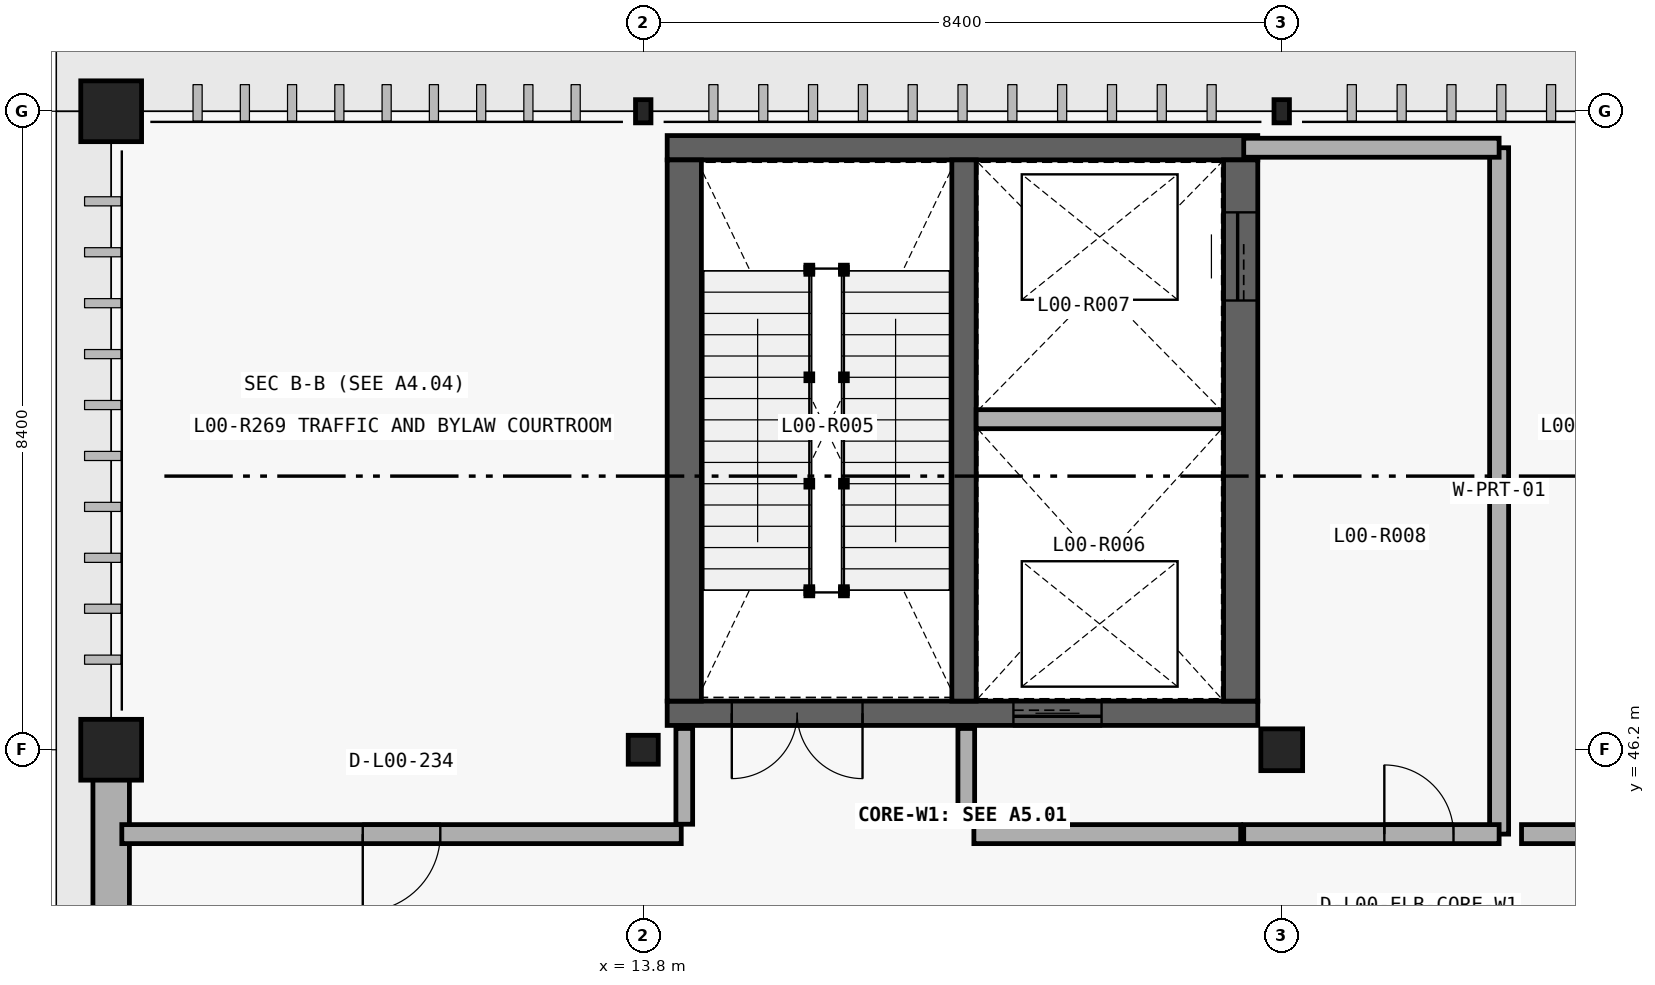
"""IFC4 building model, lengths in metres.
Left out: names, types, materials, properties, quantities, classifications, styles, units other than length and angle.
Written with IfcOpenShell. Run it as: python <this file> out.ifc"""

import sys

from ifc_helpers import new_model, si_unit, direction, frame, frame_2d, origin_with_axes, origin_2d_with_axis, place, context, subcontext, project, spatial, rectangle, hollow_rectangle, circle, i_section, extrude, element, fill, save


model = new_model("IFC4")
c1 = context("Model", 3, precision=1e-05, world=origin_with_axes(), true_north=direction((0.0, 1.0)))
c2 = subcontext(c1, "Body", "Model", "MODEL_VIEW")
j1 = project(units=[si_unit("LENGTHUNIT", "METRE"), si_unit("PLANEANGLEUNIT", "RADIAN")], contexts=[c1])
p1 = place(None, origin_with_axes())
s1 = spatial("IfcSite", under=j1, at=p1, CompositionType="ELEMENT")
p2 = place(p1, origin_with_axes())
s2 = spatial("IfcBuilding", under=s1, at=p2, CompositionType="ELEMENT")
p3 = place(p2, origin_with_axes())
s3 = spatial("IfcBuildingStorey", under=s2, at=p3, CompositionType="ELEMENT", Elevation=0.0)
p4 = place(None, frame((6.8, 40.0, 0.0), z_axis=(0.0, 0.0, 1.0), x_axis=(0.0, 1.0, 0.0)))
e1 = element("IfcWall", 1, at=p4, inside=s3, PredefinedType="SOLIDWALL", context=c2, shape_type="SweptSolid", body=[
    extrude(rectangle(XDim=6.0, YDim=0.48, at=frame_2d((3.0, 0.0), x_axis=(1.0, 0.0))), origin_with_axes(), (0.0, 0.0, 1.0), 4.724),
])
p5 = place(None, frame((6.8, 43.05, 0.0), z_axis=(0.0, 0.0, 1.0), x_axis=(0.0, 1.0, 0.0)))
e2 = element("IfcOpeningElement", 2, at=p5, cuts=e1, PredefinedType="OPENING", context=c2, shape_type="SweptSolid", body=[
    extrude(rectangle(XDim=1.9, YDim=2.4, at=frame_2d((0.0, 1.2), x_axis=(1.0, 0.0))), frame((0.0, 0.25, 0.0), z_axis=(0.0, -1.0, 0.0), x_axis=(1.0, 0.0, 0.0)), (0.0, 0.0, 1.0), 0.5),
])
p6 = place(None, frame((14.115, 46.68, 0.0), z_axis=(0.0, 0.0, 1.0), x_axis=(1.0, 0.0, 0.0)))
e3 = element("IfcWall", 3, at=p6, inside=s3, PredefinedType="SHEAR", context=c2, shape_type="SweptSolid", body=[
    extrude(rectangle(XDim=7.77, YDim=0.32, at=frame_2d((3.885, 0.0), x_axis=(1.0, 0.0))), origin_with_axes(), (0.0, 0.0, 1.0), 5.4),
])
p7 = place(None, frame((15.825, 46.68, 0.0), z_axis=(0.0, 0.0, 1.0), x_axis=(1.0, 0.0, 0.0)))
e4 = element("IfcOpeningElement", 4, at=p7, cuts=e3, PredefinedType="OPENING", context=c2, shape_type="SweptSolid", body=[
    extrude(rectangle(XDim=1.72, YDim=2.18, at=frame_2d((0.0, 1.09), x_axis=(1.0, 0.0))), frame((0.0, 0.17, 0.0), z_axis=(0.0, -1.0, 0.0), x_axis=(1.0, 0.0, 0.0)), (0.0, 0.0, 1.0), 0.34),
])
p8 = place(None, frame((19.25, 46.68, 0.0), z_axis=(0.0, 0.0, 1.0), x_axis=(1.0, 0.0, 0.0)))
e5 = element("IfcOpeningElement", 5, at=p8, cuts=e3, PredefinedType="OPENING", context=c2, shape_type="SweptSolid", body=[
    extrude(rectangle(XDim=1.16, YDim=2.2, at=frame_2d((0.0, 1.1), x_axis=(1.0, 0.0))), frame((0.0, 0.17, 0.0), z_axis=(0.0, -1.0, 0.0), x_axis=(1.0, 0.0, 0.0)), (0.0, 0.0, 1.0), 0.34),
])
p9 = place(None, frame((21.885, 54.12, 0.0), z_axis=(0.0, 0.0, 1.0), x_axis=(-1.0, 0.0, 0.0)))
e6 = element("IfcWall", 6, at=p9, inside=s3, PredefinedType="SHEAR", context=c2, shape_type="SweptSolid", body=[
    extrude(rectangle(XDim=7.77, YDim=0.32, at=frame_2d((3.885, 0.0), x_axis=(1.0, 0.0))), origin_with_axes(), (0.0, 0.0, 1.0), 5.4),
])
p10 = place(None, frame((21.66, 46.84, 0.0), z_axis=(0.0, 0.0, 1.0), x_axis=(0.0, 1.0, 0.0)))
e7 = element("IfcWall", 7, at=p10, inside=s3, PredefinedType="SHEAR", context=c2, shape_type="SweptSolid", body=[
    extrude(rectangle(XDim=7.12, YDim=0.45, at=frame_2d((3.56, 0.0), x_axis=(1.0, 0.0))), origin_with_axes(), (0.0, 0.0, 1.0), 5.4),
])
p11 = place(None, frame((21.66, 52.69, 0.0), z_axis=(0.0, 0.0, 1.0), x_axis=(0.0, 1.0, 0.0)))
e8 = element("IfcOpeningElement", 8, at=p11, cuts=e7, PredefinedType="OPENING", context=c2, shape_type="SweptSolid", body=[
    extrude(rectangle(XDim=1.16, YDim=2.2, at=frame_2d((0.0, 1.1), x_axis=(1.0, 0.0))), frame((0.0, 0.235, 0.0), z_axis=(0.0, -1.0, 0.0), x_axis=(1.0, 0.0, 0.0)), (0.0, 0.0, 1.0), 0.47),
])
p12 = place(None, frame((14.34, 53.96, 0.0), z_axis=(0.0, 0.0, 1.0), x_axis=(0.0, -1.0, 0.0)))
e9 = element("IfcWall", 9, at=p12, inside=s3, PredefinedType="SHEAR", context=c2, shape_type="SweptSolid", body=[
    extrude(rectangle(XDim=7.12, YDim=0.45, at=frame_2d((3.56, 0.0), x_axis=(1.0, 0.0))), origin_with_axes(), (0.0, 0.0, 1.0), 5.4),
])
p13 = place(None, frame((18.02, 46.84, 0.0), z_axis=(0.0, 0.0, 1.0), x_axis=(0.0, 1.0, 0.0)))
e10 = element("IfcWall", 10, at=p13, inside=s3, PredefinedType="SHEAR", context=c2, shape_type="SweptSolid", body=[
    extrude(rectangle(XDim=7.12, YDim=0.32, at=frame_2d((3.56, 0.0), x_axis=(1.0, 0.0))), origin_with_axes(), (0.0, 0.0, 1.0), 5.4),
])
p14 = place(None, frame((18.18, 50.549, 0.0), z_axis=(0.0, 0.0, 1.0), x_axis=(1.0, 0.0, 0.0)))
e11 = element("IfcWall", 11, at=p14, inside=s3, PredefinedType="PARTITIONING", context=c2, shape_type="SweptSolid", body=[
    extrude(rectangle(XDim=3.255, YDim=0.25, at=frame_2d((1.627, 0.0), x_axis=(1.0, 0.0))), origin_with_axes(), (0.0, 0.0, 1.0), 5.08),
])
p15 = place(None, frame((25.06, 45.09, 0.0), z_axis=(0.0, 0.0, 1.0), x_axis=(0.0, 1.0, 0.0)))
e12 = element("IfcWall", 12, at=p15, inside=s3, PredefinedType="PARTITIONING", context=c2, shape_type="SweptSolid", body=[
    extrude(rectangle(XDim=9.03, YDim=0.25, at=frame_2d((4.515, 0.0), x_axis=(1.0, 0.0))), origin_with_axes(), (0.0, 0.0, 1.0), 5.08),
])
p16 = place(None, frame((21.7, 54.12, 0.0), z_axis=(0.0, 0.0, 1.0), x_axis=(1.0, 0.0, 0.0)))
e13 = element("IfcWall", 13, at=p16, inside=s3, PredefinedType="PARTITIONING", context=c2, shape_type="SweptSolid", body=[
    extrude(rectangle(XDim=3.36, YDim=0.25, at=frame_2d((1.68, 0.0), x_axis=(1.0, 0.0))), origin_with_axes(), (0.0, 0.0, 1.0), 5.08),
])
p17 = place(None, frame((21.7, 45.09, 0.0), z_axis=(0.0, 0.0, 1.0), x_axis=(1.0, 0.0, 0.0)))
e14 = element("IfcWall", 14, at=p17, inside=s3, PredefinedType="PARTITIONING", context=c2, shape_type="SweptSolid", body=[
    extrude(rectangle(XDim=3.36, YDim=0.25, at=frame_2d((1.68, 0.0), x_axis=(1.0, 0.0))), origin_with_axes(), (0.0, 0.0, 1.0), 5.08),
])
p18 = place(None, frame((24.005, 45.09, 0.0), z_axis=(0.0, 0.0, 1.0), x_axis=(1.0, 0.0, 0.0)))
e15 = element("IfcOpeningElement", 15, at=p18, cuts=e14, PredefinedType="OPENING", context=c2, shape_type="SweptSolid", body=[
    extrude(rectangle(XDim=0.91, YDim=2.12, at=frame_2d((0.0, 1.06), x_axis=(1.0, 0.0))), frame((0.0, 0.135, 0.0), z_axis=(0.0, -1.0, 0.0), x_axis=(1.0, 0.0, 0.0)), (0.0, 0.0, 1.0), 0.27),
])
for number, where, z_axis, x_axis in (
    (16, (14.34, 45.22, 0.0), (0.0, 0.0, 1.0), (0.0, 1.0, 0.0)),
    (17, (18.05, 45.22, 0.0), (0.0, 0.0, 1.0), (0.0, 1.0, 0.0)),
):
    element("IfcWall", number, at=place(None, frame(where, z_axis=z_axis, x_axis=x_axis)), inside=s3, PredefinedType="PARTITIONING", context=c2, shape_type="SweptSolid", body=[
        extrude(rectangle(XDim=1.26, YDim=0.22, at=frame_2d((0.63, 0.0), x_axis=(1.0, 0.0))), origin_with_axes(), (0.0, 0.0, 1.0), 5.08),
    ])
p19 = place(None, frame((6.94, 45.09, 0.0), z_axis=(0.0, 0.0, 1.0), x_axis=(1.0, 0.0, 0.0)))
e18 = element("IfcWall", 18, at=p19, inside=s3, PredefinedType="PARTITIONING", context=c2, shape_type="SweptSolid", body=[
    extrude(rectangle(XDim=7.36, YDim=0.25, at=frame_2d((3.68, 0.0), x_axis=(1.0, 0.0))), origin_with_axes(), (0.0, 0.0, 1.0), 5.08),
])
p20 = place(None, frame((10.62, 45.09, 0.0), z_axis=(0.0, 0.0, 1.0), x_axis=(1.0, 0.0, 0.0)))
e19 = element("IfcOpeningElement", 19, at=p20, cuts=e18, PredefinedType="OPENING", context=c2, shape_type="SweptSolid", body=[
    extrude(rectangle(XDim=1.02, YDim=2.36, at=frame_2d((0.0, 1.18), x_axis=(1.0, 0.0))), frame((0.0, 0.135, 0.0), z_axis=(0.0, -1.0, 0.0), x_axis=(1.0, 0.0, 0.0)), (0.0, 0.0, 1.0), 0.27),
])
p21 = place(None, frame((18.15, 45.09, 0.0), z_axis=(0.0, 0.0, 1.0), x_axis=(1.0, 0.0, 0.0)))
e20 = element("IfcWall", 20, at=p21, inside=s3, PredefinedType="PARTITIONING", context=c2, shape_type="SweptSolid", body=[
    extrude(rectangle(XDim=3.51, YDim=0.25, at=frame_2d((1.755, 0.0), x_axis=(1.0, 0.0))), origin_with_axes(), (0.0, 0.0, 1.0), 5.08),
])
p22 = place(None, frame((25.355, 45.09, 0.0), z_axis=(0.0, 0.0, 1.0), x_axis=(1.0, 0.0, 0.0)))
e21 = element("IfcWall", 21, at=p22, inside=s3, PredefinedType="PARTITIONING", context=c2, shape_type="SweptSolid", body=[
    extrude(rectangle(XDim=5.745, YDim=0.25, at=frame_2d((2.873, 0.0), x_axis=(1.0, 0.0))), origin_with_axes(), (0.0, 0.0, 1.0), 5.08),
])
p23 = place(None, frame((28.227, 45.09, 0.0), z_axis=(0.0, 0.0, 1.0), x_axis=(1.0, 0.0, 0.0)))
e22 = element("IfcOpeningElement", 22, at=p23, cuts=e21, PredefinedType="OPENING", context=c2, shape_type="SweptSolid", body=[
    extrude(rectangle(XDim=0.95, YDim=2.16, at=frame_2d((0.0, 1.08), x_axis=(1.0, 0.0))), frame((0.0, 0.135, 0.0), z_axis=(0.0, -1.0, 0.0), x_axis=(1.0, 0.0, 0.0)), (0.0, 0.0, 1.0), 0.27),
])
for number, where, z_axis, x_axis in (
    (23, (6.8, 46.2, 0.0), (0.0, 0.0, 1.0), (1.0, 0.0, 0.0)),
    (24, (6.8, 54.6, 0.0), (0.0, 0.0, 1.0), (1.0, 0.0, 0.0)),
):
    element("IfcColumn", number, at=place(None, frame(where, z_axis=z_axis, x_axis=x_axis)), inside=s3, PredefinedType="COLUMN", context=c2, shape_type="SweptSolid", body=[
        extrude(circle(Radius=0.4, at=origin_2d_with_axis()), origin_with_axes(), (0.0, 0.0, 1.0), 5.4),
    ])
p24 = place(None, frame((13.8, 46.2, 0.0), z_axis=(0.0, 0.0, 1.0), x_axis=(1.0, 0.0, 0.0)))
e25 = element("IfcColumn", 25, at=p24, inside=s3, PredefinedType="COLUMN", context=c2, shape_type="SweptSolid", body=[
    extrude(i_section(OverallWidth=0.395, OverallDepth=0.38, WebThickness=0.019, FlangeThickness=0.03, at=origin_2d_with_axis()), origin_with_axes(), (0.0, 0.0, 1.0), 5.4),
])
p25 = place(None, frame((13.8, 54.6, 0.0), z_axis=(0.0, 0.0, 1.0), x_axis=(1.0, 0.0, 0.0)))
e26 = element("IfcColumn", 26, at=p25, inside=s3, PredefinedType="COLUMN", context=c2, shape_type="SweptSolid", body=[
    extrude(hollow_rectangle(XDim=0.203, YDim=0.305, WallThickness=0.013, InnerFilletRadius=0.025, OuterFilletRadius=0.013, at=origin_2d_with_axis()), origin_with_axes(), (0.0, 0.0, 1.0), 5.4),
])
p26 = place(None, frame((22.2, 46.2, 0.0), z_axis=(0.0, 0.0, 1.0), x_axis=(1.0, 0.0, 0.0)))
e27 = element("IfcColumn", 27, at=p26, inside=s3, PredefinedType="COLUMN", context=c2, shape_type="SweptSolid", body=[
    extrude(i_section(OverallWidth=0.55, OverallDepth=0.55, WebThickness=0.025, FlangeThickness=0.042, at=origin_2d_with_axis()), origin_with_axes(), (0.0, 0.0, 1.0), 5.4),
])
p27 = place(None, frame((22.2, 54.6, 0.0), z_axis=(0.0, 0.0, 1.0), x_axis=(1.0, 0.0, 0.0)))
e28 = element("IfcColumn", 28, at=p27, inside=s3, PredefinedType="COLUMN", context=c2, shape_type="SweptSolid", body=[
    extrude(hollow_rectangle(XDim=0.203, YDim=0.305, WallThickness=0.013, InnerFilletRadius=0.025, OuterFilletRadius=0.013, at=origin_2d_with_axis()), origin_with_axes(), (0.0, 0.0, 1.0), 5.4),
])
p28 = place(None, frame((15.825, 46.68, 0.0), z_axis=(0.0, 0.0, 1.0), x_axis=(-1.0, 0.0, 0.0)))
e29 = element("IfcDoor", 29, at=p28, inside=s3, OperationType="DOUBLE_DOOR_SINGLE_SWING", PredefinedType="DOOR", context=c2, shape_type="SweptSolid", body=[
    extrude(rectangle(XDim=1.72, YDim=2.18, at=frame_2d((0.0, 1.09), x_axis=(1.0, 0.0))), frame((0.0, 0.04, 0.0), z_axis=(0.0, -1.0, 0.0), x_axis=(1.0, 0.0, 0.0)), (0.0, 0.0, 1.0), 0.08),
])
fill(e4, e29)
p29 = place(None, frame((19.25, 46.68, 0.0), z_axis=(0.0, 0.0, 1.0), x_axis=(-1.0, 0.0, 0.0)))
e30 = element("IfcDoor", 30, at=p29, inside=s3, OperationType="SLIDING_TO_LEFT", PredefinedType="DOOR", context=c2, shape_type="SweptSolid", body=[
    extrude(rectangle(XDim=1.16, YDim=2.2, at=frame_2d((0.0, 1.1), x_axis=(1.0, 0.0))), frame((0.0, 0.04, 0.0), z_axis=(0.0, -1.0, 0.0), x_axis=(1.0, 0.0, 0.0)), (0.0, 0.0, 1.0), 0.08),
])
fill(e5, e30)
p30 = place(None, frame((21.66, 52.69, 0.0), z_axis=(0.0, 0.0, 1.0), x_axis=(0.0, 1.0, 0.0)))
e31 = element("IfcDoor", 31, at=p30, inside=s3, OperationType="SLIDING_TO_LEFT", PredefinedType="DOOR", context=c2, shape_type="SweptSolid", body=[
    extrude(rectangle(XDim=1.16, YDim=2.2, at=frame_2d((0.0, 1.1), x_axis=(1.0, 0.0))), frame((0.0, 0.04, 0.0), z_axis=(0.0, -1.0, 0.0), x_axis=(1.0, 0.0, 0.0)), (0.0, 0.0, 1.0), 0.08),
])
fill(e8, e31)
p31 = place(None, frame((24.005, 45.09, 0.0), z_axis=(0.0, 0.0, 1.0), x_axis=(1.0, 0.0, 0.0)))
e32 = element("IfcDoor", 32, at=p31, inside=s3, OperationType="SINGLE_SWING_LEFT", PredefinedType="DOOR", context=c2, shape_type="SweptSolid", body=[
    extrude(rectangle(XDim=0.91, YDim=2.12, at=frame_2d((0.0, 1.06), x_axis=(1.0, 0.0))), frame((0.0, 0.04, 0.0), z_axis=(0.0, -1.0, 0.0), x_axis=(1.0, 0.0, 0.0)), (0.0, 0.0, 1.0), 0.08),
])
fill(e15, e32)
p32 = place(None, frame((10.62, 45.09, 0.0), z_axis=(0.0, 0.0, 1.0), x_axis=(-1.0, 0.0, 0.0)))
e33 = element("IfcDoor", 33, at=p32, inside=s3, OperationType="SINGLE_SWING_LEFT", PredefinedType="DOOR", context=c2, shape_type="SweptSolid", body=[
    extrude(rectangle(XDim=1.02, YDim=2.36, at=frame_2d((0.0, 1.18), x_axis=(1.0, 0.0))), frame((0.0, 0.04, 0.0), z_axis=(0.0, -1.0, 0.0), x_axis=(1.0, 0.0, 0.0)), (0.0, 0.0, 1.0), 0.08),
])
fill(e19, e33)
save(model, sys.argv[1])
